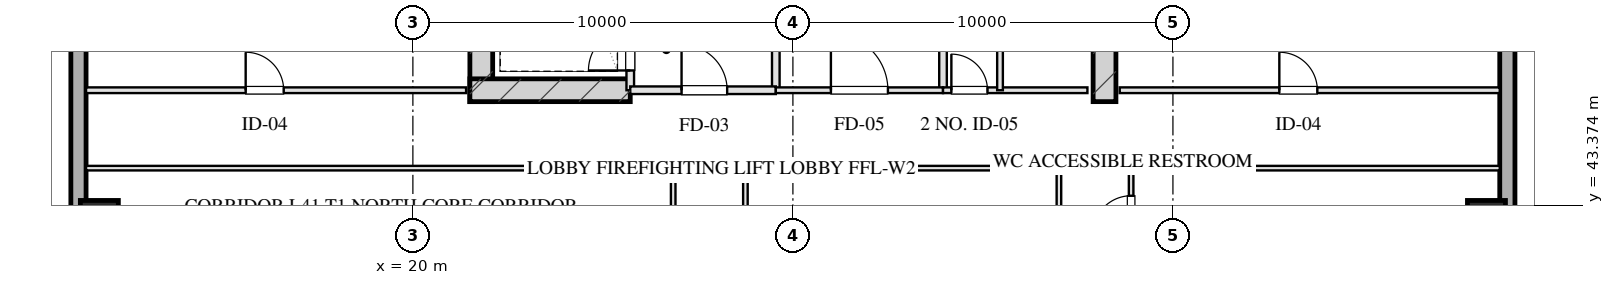
"""IFC4 building model, lengths in metres.
Left out: names, types, materials, properties, quantities, classifications, styles, units other than length and angle.
Written with IfcOpenShell. Run it as: python <this file> out.ifc"""

import sys

from ifc_helpers import new_model, si_unit, direction, frame, frame_2d, origin, origin_2d, place, context, subcontext, project, spatial, rectangle, hollow_rectangle, extrude, element, fill, save


model = new_model("IFC4")
c1 = context("Model", 3, precision=1e-05, world=origin(), true_north=direction((0.0, 1.0)))
c2 = subcontext(c1, "Body", "Model", "MODEL_VIEW")
j1 = project(units=[si_unit("LENGTHUNIT", "METRE"), si_unit("PLANEANGLEUNIT", "RADIAN")], contexts=[c1])
p1 = place(None, origin())
s1 = spatial("IfcSite", under=j1, at=p1, CompositionType="ELEMENT")
p2 = place(p1, origin())
s2 = spatial("IfcBuilding", under=s1, at=p2, CompositionType="ELEMENT")
p3 = place(p2, frame((0.0, 0.0, 156.4)))
s3 = spatial("IfcBuildingStorey", under=s2, at=p3, CompositionType="ELEMENT", Elevation=156.4)
for number, where, z_axis, x_axis in (
    (1, (21.8, 46.1, 0.0), (0.0, 0.0, 1.0), (0.0, 1.0, 0.0)),
    (2, (38.2, 46.1, 0.0), (0.0, 0.0, 1.0), (0.0, 1.0, 0.0)),
):
    element("IfcWall", number, at=place(p3, frame(where, z_axis=z_axis, x_axis=x_axis)), inside=s3, PredefinedType="SHEAR", context=c2, shape_type="SweptSolid", body=[
        extrude(rectangle(XDim=9.48, YDim=0.6, at=frame_2d((4.74, 0.0))), origin(), (0.0, 0.0, 1.0), 3.45),
    ])
p4 = place(p3, frame((21.5, 46.4, 0.0), z_axis=(0.0, 0.0, 1.0), x_axis=(1.0, 0.0, 0.0)))
e3 = element("IfcWall", 3, at=p4, inside=s3, PredefinedType="SHEAR", context=c2, shape_type="SweptSolid", body=[
    extrude(rectangle(XDim=4.22, YDim=0.6, at=frame_2d((2.11, 0.0))), origin(), (0.0, 0.0, 1.0), 3.45),
])
for number, where, z_axis, x_axis in (
    (4, (11.75, 43.0, 0.0), (0.0, 0.0, 1.0), (1.0, 0.0, 0.0)),
    (5, (48.25, 43.0, 0.0), (0.0, 0.0, 1.0), (1.0, 0.0, 0.0)),
):
    element("IfcColumn", number, at=place(p3, frame(where, z_axis=z_axis, x_axis=x_axis)), inside=s3, PredefinedType="COLUMN", context=c2, shape_type="SweptSolid", body=[
        extrude(hollow_rectangle(XDim=1.0, YDim=1.0, WallThickness=0.036, at=origin_2d()), origin(), (0.0, 0.0, 1.0), 3.451),
    ])
p5 = place(p3, frame((11.2, 9.0, 0.0), z_axis=(0.0, 0.0, 1.0), x_axis=(0.0, 1.0, 0.0)))
e6 = element("IfcWall", 6, at=p5, inside=s3, PredefinedType="SOLIDWALL", context=c2, shape_type="SweptSolid", body=[
    extrude(rectangle(XDim=50.0, YDim=0.4, at=frame_2d((25.0, 0.0))), origin(), (0.0, 0.0, 1.0), 2.61),
])
p6 = place(p5, frame((17.475, 0.0, 0.75)))
e7 = element("IfcOpeningElement", 7, at=p6, cuts=e6, PredefinedType="OPENING", context=c2, shape_type="SweptSolid", body=[
    extrude(rectangle(XDim=2.25, YDim=1.46, at=frame_2d((1.125, 0.73))), frame((0.0, 0.21, 0.0), z_axis=(0.0, -1.0, 0.0), x_axis=(1.0, 0.0, 0.0)), (0.0, 0.0, 1.0), 0.42),
])
p7 = place(p5, frame((30.25, 0.0, 0.0)))
e8 = element("IfcOpeningElement", 8, at=p7, cuts=e6, PredefinedType="OPENING", context=c2, shape_type="SweptSolid", body=[
    extrude(rectangle(XDim=1.1, YDim=2.15, at=frame_2d((0.55, 1.075))), frame((0.0, 0.21, 0.0), z_axis=(0.0, -1.0, 0.0), x_axis=(1.0, 0.0, 0.0)), (0.0, 0.0, 1.0), 0.42),
])
p8 = place(p3, frame((48.8, 59.0, 0.0), z_axis=(0.0, 0.0, 1.0), x_axis=(0.0, -1.0, 0.0)))
e9 = element("IfcWall", 9, at=p8, inside=s3, PredefinedType="SOLIDWALL", context=c2, shape_type="SweptSolid", body=[
    extrude(rectangle(XDim=50.0, YDim=0.4, at=frame_2d((25.0, 0.0))), origin(), (0.0, 0.0, 1.0), 2.61),
])
p9 = place(p8, frame((21.35, 0.0, 0.0)))
e10 = element("IfcOpeningElement", 10, at=p9, cuts=e9, PredefinedType="OPENING", context=c2, shape_type="SweptSolid", body=[
    extrude(rectangle(XDim=1.1, YDim=2.15, at=frame_2d((0.55, 1.075))), frame((0.0, 0.21, 0.0), z_axis=(0.0, -1.0, 0.0), x_axis=(1.0, 0.0, 0.0)), (0.0, 0.0, 1.0), 0.42),
])
p10 = place(p3, frame((25.72, 46.4, 0.0), z_axis=(0.0, 0.0, 1.0), x_axis=(0.0, 1.0, 0.0)))
e11 = element("IfcWall", 11, at=p10, inside=s3, PredefinedType="PARTITIONING", context=c2, shape_type="SweptSolid", body=[
    extrude(rectangle(XDim=1.9, YDim=0.2, at=frame_2d((0.95, 0.0))), origin(), (0.0, 0.0, 1.0), 3.175),
])
p11 = place(p10, frame((0.52, 0.0, 0.0)))
e12 = element("IfcOpeningElement", 12, at=p11, cuts=e11, PredefinedType="OPENING", context=c2, shape_type="SweptSolid", body=[
    extrude(rectangle(XDim=1.1, YDim=2.05, at=frame_2d((0.55, 1.025))), frame((0.0, 0.11, 0.0), z_axis=(0.0, -1.0, 0.0), x_axis=(1.0, 0.0, 0.0)), (0.0, 0.0, 1.0), 0.22),
])
p12 = place(p3, frame((29.55, 46.4, 0.0), z_axis=(0.0, 0.0, 1.0), x_axis=(0.0, 1.0, 0.0)))
e13 = element("IfcWall", 13, at=p12, inside=s3, PredefinedType="PARTITIONING", context=c2, shape_type="SweptSolid", body=[
    extrude(rectangle(XDim=8.43, YDim=0.2, at=frame_2d((4.215, 0.0))), origin(), (0.0, 0.0, 1.0), 3.175),
])
p13 = place(p3, frame((25.72, 46.4, 0.0), z_axis=(0.0, 0.0, 1.0), x_axis=(1.0, 0.0, 0.0)))
e14 = element("IfcWall", 14, at=p13, inside=s3, PredefinedType="PARTITIONING", context=c2, shape_type="SweptSolid", body=[
    extrude(rectangle(XDim=3.83, YDim=0.2, at=frame_2d((1.915, 0.0))), origin(), (0.0, 0.0, 1.0), 3.175),
])
p14 = place(p13, frame((1.35, 0.0, 0.0)))
e15 = element("IfcOpeningElement", 15, at=p14, cuts=e14, PredefinedType="OPENING", context=c2, shape_type="SweptSolid", body=[
    extrude(rectangle(XDim=1.2, YDim=2.05, at=frame_2d((0.6, 1.025))), frame((0.0, 0.11, 0.0), z_axis=(0.0, -1.0, 0.0), x_axis=(1.0, 0.0, 0.0)), (0.0, 0.0, 1.0), 0.22),
])
p15 = place(p3, frame((33.95, 46.4, 0.0), z_axis=(0.0, 0.0, 1.0), x_axis=(0.0, 1.0, 0.0)))
e16 = element("IfcWall", 16, at=p15, inside=s3, PredefinedType="PARTITIONING", context=c2, shape_type="SweptSolid", body=[
    extrude(rectangle(XDim=8.43, YDim=0.2, at=frame_2d((4.215, 0.0))), origin(), (0.0, 0.0, 1.0), 3.175),
])
p16 = place(p3, frame((29.55, 46.4, 0.0), z_axis=(0.0, 0.0, 1.0), x_axis=(1.0, 0.0, 0.0)))
e17 = element("IfcWall", 17, at=p16, inside=s3, PredefinedType="PARTITIONING", context=c2, shape_type="SweptSolid", body=[
    extrude(rectangle(XDim=4.4, YDim=0.15, at=frame_2d((2.2, 0.0))), origin(), (0.0, 0.0, 1.0), 3.175),
])
p17 = place(p16, frame((1.45, 0.0, 0.0)))
e18 = element("IfcOpeningElement", 18, at=p17, cuts=e17, PredefinedType="OPENING", context=c2, shape_type="SweptSolid", body=[
    extrude(rectangle(XDim=1.5, YDim=2.05, at=frame_2d((0.75, 1.025))), frame((0.0, 0.085, 0.0), z_axis=(0.0, -1.0, 0.0), x_axis=(1.0, 0.0, 0.0)), (0.0, 0.0, 1.0), 0.17),
])
p18 = place(p3, frame((33.95, 46.4, 0.0), z_axis=(0.0, 0.0, 1.0), x_axis=(1.0, 0.0, 0.0)))
e19 = element("IfcWall", 19, at=p18, inside=s3, PredefinedType="PARTITIONING", context=c2, shape_type="SweptSolid", body=[
    extrude(rectangle(XDim=3.8, YDim=0.15, at=frame_2d((1.9, 0.0))), origin(), (0.0, 0.0, 1.0), 3.175),
])
p19 = place(p18, frame((0.22, 0.0, 0.0)))
e20 = element("IfcOpeningElement", 20, at=p19, cuts=e19, PredefinedType="OPENING", context=c2, shape_type="SweptSolid", body=[
    extrude(rectangle(XDim=0.95, YDim=2.05, at=frame_2d((0.475, 1.025))), frame((0.0, 0.085, 0.0), z_axis=(0.0, -1.0, 0.0), x_axis=(1.0, 0.0, 0.0)), (0.0, 0.0, 1.0), 0.17),
])
p20 = place(p3, frame((35.45, 46.4, 0.0), z_axis=(0.0, 0.0, 1.0), x_axis=(0.0, 1.0, 0.0)))
e21 = element("IfcWall", 21, at=p20, inside=s3, PredefinedType="PARTITIONING", context=c2, shape_type="SweptSolid", body=[
    extrude(rectangle(XDim=8.43, YDim=0.15, at=frame_2d((4.215, 0.0))), origin(), (0.0, 0.0, 1.0), 2.815),
])
p21 = place(p20, frame((2.55, 0.0, 0.0)))
e22 = element("IfcOpeningElement", 22, at=p21, cuts=e21, PredefinedType="OPENING", context=c2, shape_type="SweptSolid", body=[
    extrude(rectangle(XDim=0.95, YDim=2.05, at=frame_2d((0.475, 1.025))), frame((0.0, 0.085, 0.0), z_axis=(0.0, -1.0, 0.0), x_axis=(1.0, 0.0, 0.0)), (0.0, 0.0, 1.0), 0.17),
])
p22 = place(p20, frame((5.8, 0.0, 0.0)))
e23 = element("IfcOpeningElement", 23, at=p22, cuts=e21, PredefinedType="OPENING", context=c2, shape_type="SweptSolid", body=[
    extrude(rectangle(XDim=0.9, YDim=2.05, at=frame_2d((0.45, 1.025))), frame((0.0, 0.085, 0.0), z_axis=(0.0, -1.0, 0.0), x_axis=(1.0, 0.0, 0.0)), (0.0, 0.0, 1.0), 0.17),
])
p23 = place(p3, frame((11.4, 46.4, 0.0), z_axis=(0.0, 0.0, 1.0), x_axis=(1.0, 0.0, 0.0)))
e24 = element("IfcWall", 24, at=p23, inside=s3, PredefinedType="PARTITIONING", context=c2, shape_type="SweptSolid", body=[
    extrude(rectangle(XDim=10.0, YDim=0.15, at=frame_2d((5.0, 0.0))), origin(), (0.0, 0.0, 1.0), 2.15),
])
p24 = place(p23, frame((4.2, 0.0, 0.0)))
e25 = element("IfcOpeningElement", 25, at=p24, cuts=e24, PredefinedType="OPENING", context=c2, shape_type="SweptSolid", body=[
    extrude(rectangle(XDim=1.0, YDim=2.05, at=frame_2d((0.5, 1.025))), frame((0.0, 0.085, 0.0), z_axis=(0.0, -1.0, 0.0), x_axis=(1.0, 0.0, 0.0)), (0.0, 0.0, 1.0), 0.17),
])
p25 = place(p3, frame((38.6, 46.4, 0.0), z_axis=(0.0, 0.0, 1.0), x_axis=(1.0, 0.0, 0.0)))
e26 = element("IfcWall", 26, at=p25, inside=s3, PredefinedType="PARTITIONING", context=c2, shape_type="SweptSolid", body=[
    extrude(rectangle(XDim=10.0, YDim=0.15, at=frame_2d((5.0, 0.0))), origin(), (0.0, 0.0, 1.0), 2.15),
])
p26 = place(p25, frame((4.2, 0.0, 0.0)))
e27 = element("IfcOpeningElement", 27, at=p26, cuts=e26, PredefinedType="OPENING", context=c2, shape_type="SweptSolid", body=[
    extrude(rectangle(XDim=1.0, YDim=2.05, at=frame_2d((0.5, 1.025))), frame((0.0, 0.085, 0.0), z_axis=(0.0, -1.0, 0.0), x_axis=(1.0, 0.0, 0.0)), (0.0, 0.0, 1.0), 0.17),
])
p27 = place(p3, frame((11.4, 44.35, 0.0), z_axis=(0.0, 0.0, 1.0), x_axis=(1.0, 0.0, 0.0)))
e28 = element("IfcWall", 28, at=p27, inside=s3, PredefinedType="PARTITIONING", context=c2, shape_type="SweptSolid", body=[
    extrude(rectangle(XDim=15.45, YDim=0.12, at=frame_2d((7.725, 0.0))), origin(), (0.0, 0.0, 1.0), 2.15),
])
p28 = place(p3, frame((28.75, 44.35, 0.0), z_axis=(0.0, 0.0, 1.0), x_axis=(1.0, 0.0, 0.0)))
e29 = element("IfcWall", 29, at=p28, inside=s3, PredefinedType="PARTITIONING", context=c2, shape_type="SweptSolid", body=[
    extrude(rectangle(XDim=8.25, YDim=0.12, at=frame_2d((4.125, 0.0))), origin(), (0.0, 0.0, 1.0), 3.175),
])
p29 = place(p3, frame((38.9, 44.35, 0.0), z_axis=(0.0, 0.0, 1.0), x_axis=(1.0, 0.0, 0.0)))
e30 = element("IfcWall", 30, at=p29, inside=s3, PredefinedType="PARTITIONING", context=c2, shape_type="SweptSolid", body=[
    extrude(rectangle(XDim=9.7, YDim=0.12, at=frame_2d((4.85, 0.0))), origin(), (0.0, 0.0, 1.0), 2.15),
])
p30 = place(p3, frame((26.85, 23.65, 0.0), z_axis=(0.0, 0.0, 1.0), x_axis=(0.0, 1.0, 0.0)))
e31 = element("IfcWall", 31, at=p30, inside=s3, PredefinedType="PARTITIONING", context=c2, shape_type="SweptSolid", body=[
    extrude(rectangle(XDim=20.7, YDim=0.12, at=frame_2d((10.35, 0.0))), origin(), (0.0, 0.0, 1.0), 3.175),
])
p31 = place(p30, frame((2.675, 0.0, 0.0)))
e32 = element("IfcOpeningElement", 32, at=p31, cuts=e31, PredefinedType="OPENING", context=c2, shape_type="SweptSolid", body=[
    extrude(rectangle(XDim=1.0, YDim=2.05, at=frame_2d((0.5, 1.025))), frame((0.0, 0.07, 0.0), z_axis=(0.0, -1.0, 0.0), x_axis=(1.0, 0.0, 0.0)), (0.0, 0.0, 1.0), 0.14),
])
p32 = place(p30, frame((9.85, 0.0, 0.0)))
e33 = element("IfcOpeningElement", 33, at=p32, cuts=e31, PredefinedType="OPENING", context=c2, shape_type="SweptSolid", body=[
    extrude(rectangle(XDim=1.05, YDim=2.05, at=frame_2d((0.525, 1.025))), frame((0.0, 0.07, 0.0), z_axis=(0.0, -1.0, 0.0), x_axis=(1.0, 0.0, 0.0)), (0.0, 0.0, 1.0), 0.14),
])
p33 = place(p30, frame((17.025, 0.0, 0.0)))
e34 = element("IfcOpeningElement", 34, at=p33, cuts=e31, PredefinedType="OPENING", context=c2, shape_type="SweptSolid", body=[
    extrude(rectangle(XDim=1.0, YDim=2.05, at=frame_2d((0.5, 1.025))), frame((0.0, 0.07, 0.0), z_axis=(0.0, -1.0, 0.0), x_axis=(1.0, 0.0, 0.0)), (0.0, 0.0, 1.0), 0.14),
])
p34 = place(p3, frame((28.75, 23.65, 0.0), z_axis=(0.0, 0.0, 1.0), x_axis=(0.0, 1.0, 0.0)))
e35 = element("IfcWall", 35, at=p34, inside=s3, PredefinedType="PARTITIONING", context=c2, shape_type="SweptSolid", body=[
    extrude(rectangle(XDim=20.7, YDim=0.12, at=frame_2d((10.35, 0.0))), origin(), (0.0, 0.0, 1.0), 3.175),
])
p35 = place(p34, frame((9.936, 0.0, 0.0)))
e36 = element("IfcOpeningElement", 36, at=p35, cuts=e35, PredefinedType="OPENING", context=c2, shape_type="SweptSolid", body=[
    extrude(rectangle(XDim=1.1, YDim=2.05, at=frame_2d((0.55, 1.025))), frame((0.0, 0.07, 0.0), z_axis=(0.0, -1.0, 0.0), x_axis=(1.0, 0.0, 0.0)), (0.0, 0.0, 1.0), 0.14),
])
p36 = place(p3, frame((37.0, 23.65, 0.0), z_axis=(0.0, 0.0, 1.0), x_axis=(0.0, 1.0, 0.0)))
e37 = element("IfcWall", 37, at=p36, inside=s3, PredefinedType="PARTITIONING", context=c2, shape_type="SweptSolid", body=[
    extrude(rectangle(XDim=20.7, YDim=0.12, at=frame_2d((10.35, 0.0))), origin(), (0.0, 0.0, 1.0), 3.175),
])
p37 = place(p3, frame((38.9, 23.65, 0.0), z_axis=(0.0, 0.0, 1.0), x_axis=(0.0, 1.0, 0.0)))
e38 = element("IfcWall", 38, at=p37, inside=s3, PredefinedType="PARTITIONING", context=c2, shape_type="SweptSolid", body=[
    extrude(rectangle(XDim=20.7, YDim=0.12, at=frame_2d((10.35, 0.0))), origin(), (0.0, 0.0, 1.0), 3.175),
])
p38 = place(p37, frame((0.775, 0.0, 0.0)))
e39 = element("IfcOpeningElement", 39, at=p38, cuts=e38, PredefinedType="OPENING", context=c2, shape_type="SweptSolid", body=[
    extrude(rectangle(XDim=0.85, YDim=2.05, at=frame_2d((0.425, 1.025))), frame((0.0, 0.07, 0.0), z_axis=(0.0, -1.0, 0.0), x_axis=(1.0, 0.0, 0.0)), (0.0, 0.0, 1.0), 0.14),
])
p39 = place(p37, frame((3.95, 0.0, 0.0)))
e40 = element("IfcOpeningElement", 40, at=p39, cuts=e38, PredefinedType="OPENING", context=c2, shape_type="SweptSolid", body=[
    extrude(rectangle(XDim=1.0, YDim=2.05, at=frame_2d((0.5, 1.025))), frame((0.0, 0.07, 0.0), z_axis=(0.0, -1.0, 0.0), x_axis=(1.0, 0.0, 0.0)), (0.0, 0.0, 1.0), 0.14),
])
p40 = place(p37, frame((8.45, 0.0, 0.0)))
e41 = element("IfcOpeningElement", 41, at=p40, cuts=e38, PredefinedType="OPENING", context=c2, shape_type="SweptSolid", body=[
    extrude(rectangle(XDim=1.0, YDim=2.05, at=frame_2d((0.5, 1.025))), frame((0.0, 0.07, 0.0), z_axis=(0.0, -1.0, 0.0), x_axis=(1.0, 0.0, 0.0)), (0.0, 0.0, 1.0), 0.14),
])
p41 = place(p37, frame((12.95, 0.0, 0.0)))
e42 = element("IfcOpeningElement", 42, at=p41, cuts=e38, PredefinedType="OPENING", context=c2, shape_type="SweptSolid", body=[
    extrude(rectangle(XDim=1.0, YDim=2.05, at=frame_2d((0.5, 1.025))), frame((0.0, 0.07, 0.0), z_axis=(0.0, -1.0, 0.0), x_axis=(1.0, 0.0, 0.0)), (0.0, 0.0, 1.0), 0.14),
])
p42 = place(p37, frame((16.299, 0.0, 0.0)))
e43 = element("IfcOpeningElement", 43, at=p42, cuts=e38, PredefinedType="OPENING", context=c2, shape_type="SweptSolid", body=[
    extrude(rectangle(XDim=1.05, YDim=2.05, at=frame_2d((0.525, 1.025))), frame((0.0, 0.07, 0.0), z_axis=(0.0, -1.0, 0.0), x_axis=(1.0, 0.0, 0.0)), (0.0, 0.0, 1.0), 0.14),
])
p43 = place(p37, frame((18.974, 0.0, 0.0)))
e44 = element("IfcOpeningElement", 44, at=p43, cuts=e38, PredefinedType="OPENING", context=c2, shape_type="SweptSolid", body=[
    extrude(rectangle(XDim=1.0, YDim=2.05, at=frame_2d((0.5, 1.025))), frame((0.0, 0.07, 0.0), z_axis=(0.0, -1.0, 0.0), x_axis=(1.0, 0.0, 0.0)), (0.0, 0.0, 1.0), 0.14),
])
p44 = place(p11, origin())
e45 = element("IfcDoor", 45, at=p44, inside=s3, OperationType="SINGLE_SWING_LEFT", PredefinedType="DOOR", context=c2, shape_type="SweptSolid", body=[
    extrude(rectangle(XDim=1.1, YDim=2.05, at=frame_2d((0.55, 1.025))), frame((0.0, 0.025, 0.0), z_axis=(0.0, -1.0, 0.0), x_axis=(1.0, 0.0, 0.0)), (0.0, 0.0, 1.0), 0.05),
])
fill(e12, e45)
p45 = place(p14, origin())
e46 = element("IfcDoor", 46, at=p45, inside=s3, OperationType="SINGLE_SWING_LEFT", PredefinedType="DOOR", context=c2, shape_type="SweptSolid", body=[
    extrude(rectangle(XDim=1.2, YDim=2.05, at=frame_2d((0.6, 1.025))), frame((0.0, 0.025, 0.0), z_axis=(0.0, -1.0, 0.0), x_axis=(1.0, 0.0, 0.0)), (0.0, 0.0, 1.0), 0.05),
])
fill(e15, e46)
p46 = place(p17, origin())
e47 = element("IfcDoor", 47, at=p46, inside=s3, OperationType="SINGLE_SWING_LEFT", PredefinedType="DOOR", context=c2, shape_type="SweptSolid", body=[
    extrude(rectangle(XDim=1.5, YDim=2.05, at=frame_2d((0.75, 1.025))), frame((0.0, 0.025, 0.0), z_axis=(0.0, -1.0, 0.0), x_axis=(1.0, 0.0, 0.0)), (0.0, 0.0, 1.0), 0.05),
])
fill(e18, e47)
p47 = place(p19, origin())
e48 = element("IfcDoor", 48, at=p47, inside=s3, OperationType="SINGLE_SWING_LEFT", PredefinedType="DOOR", context=c2, shape_type="SweptSolid", body=[
    extrude(rectangle(XDim=0.95, YDim=2.05, at=frame_2d((0.475, 1.025))), frame((0.0, 0.025, 0.0), z_axis=(0.0, -1.0, 0.0), x_axis=(1.0, 0.0, 0.0)), (0.0, 0.0, 1.0), 0.05),
])
fill(e20, e48)
p48 = place(p24, origin())
e49 = element("IfcDoor", 49, at=p48, inside=s3, OperationType="SINGLE_SWING_LEFT", PredefinedType="DOOR", context=c2, shape_type="SweptSolid", body=[
    extrude(rectangle(XDim=1.0, YDim=2.05, at=frame_2d((0.5, 1.025))), frame((0.0, 0.025, 0.0), z_axis=(0.0, -1.0, 0.0), x_axis=(1.0, 0.0, 0.0)), (0.0, 0.0, 1.0), 0.05),
])
fill(e25, e49)
p49 = place(p26, origin())
e50 = element("IfcDoor", 50, at=p49, inside=s3, OperationType="SINGLE_SWING_LEFT", PredefinedType="DOOR", context=c2, shape_type="SweptSolid", body=[
    extrude(rectangle(XDim=1.0, YDim=2.05, at=frame_2d((0.5, 1.025))), frame((0.0, 0.025, 0.0), z_axis=(0.0, -1.0, 0.0), x_axis=(1.0, 0.0, 0.0)), (0.0, 0.0, 1.0), 0.05),
])
fill(e27, e50)
p50 = place(p43, origin())
e51 = element("IfcDoor", 51, at=p50, inside=s3, OperationType="SINGLE_SWING_LEFT", PredefinedType="DOOR", context=c2, shape_type="SweptSolid", body=[
    extrude(rectangle(XDim=1.0, YDim=2.05, at=frame_2d((0.5, 1.025))), frame((0.0, 0.025, 0.0), z_axis=(0.0, -1.0, 0.0), x_axis=(1.0, 0.0, 0.0)), (0.0, 0.0, 1.0), 0.05),
])
fill(e44, e51)
save(model, sys.argv[1])
